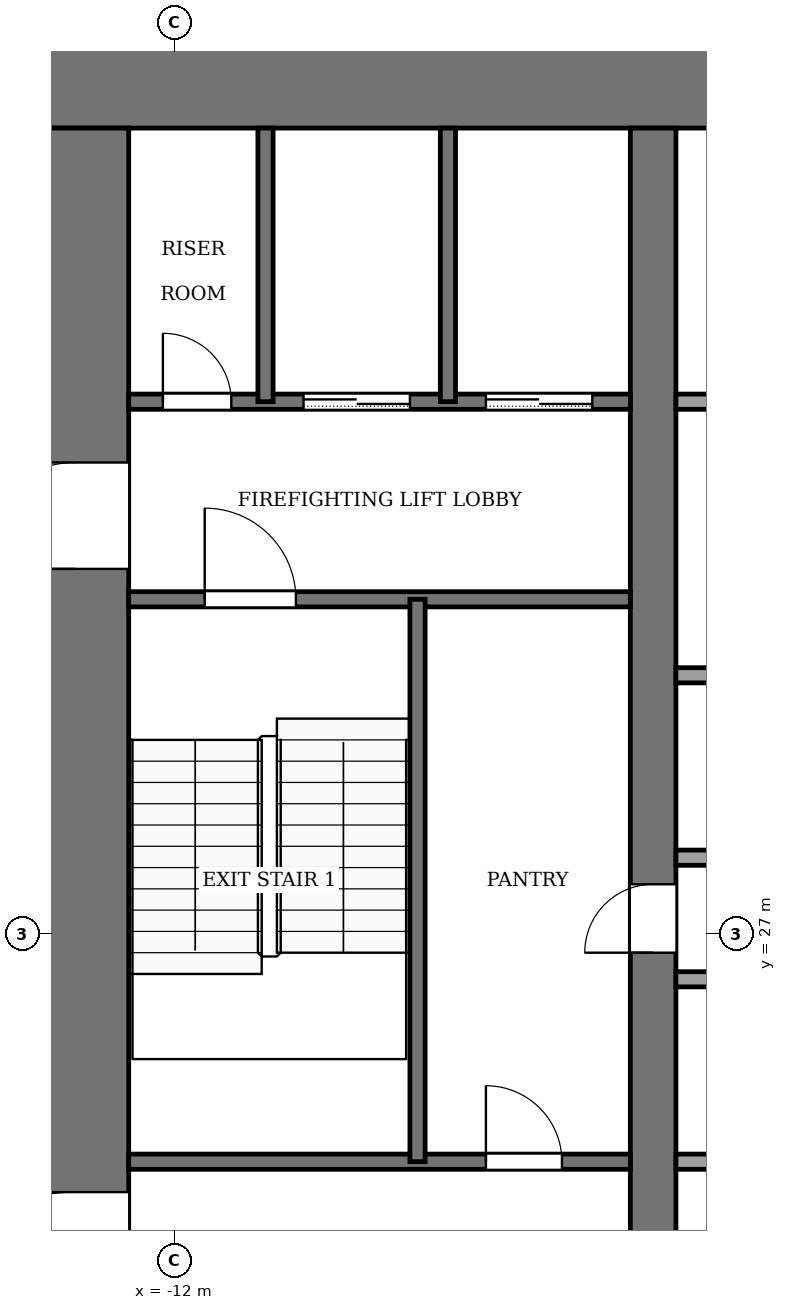
"""IFC4 building model, lengths in metres.
Left out: names, types, materials, properties, quantities, classifications, styles, units other than length and angle.
Written with IfcOpenShell. Run it as: python <this file> out.ifc"""

import sys

from ifc_helpers import new_model, si_unit, direction, frame, frame_2d, origin, place, context, subcontext, project, spatial, rectangle, extrude, element, fill, save


model = new_model("IFC4")
c1 = context("Model", 3, precision=1e-05, world=origin(), true_north=direction((0.0, 1.0)))
c2 = subcontext(c1, "Body", "Model", "MODEL_VIEW")
j1 = project(units=[si_unit("LENGTHUNIT", "METRE"), si_unit("PLANEANGLEUNIT", "RADIAN")], contexts=[c1])
p1 = place(None, origin())
s1 = spatial("IfcSite", under=j1, at=p1, CompositionType="ELEMENT")
p2 = place(p1, origin())
s2 = spatial("IfcBuilding", under=s1, at=p2, CompositionType="ELEMENT")
p3 = place(p2, frame((0.0, 0.0, 46.0)))
s3 = spatial("IfcBuildingStorey", under=s2, at=p3, CompositionType="ELEMENT", Elevation=46.0)
p4 = place(p3, frame((-14.0, 38.3, -0.13), z_axis=(0.0, 0.0, 1.0), x_axis=(1.0, 0.0, 0.0)))
e1 = element("IfcWall", 1, at=p4, inside=s3, PredefinedType="SHEAR", context=c2, shape_type="SweptSolid", body=[
    extrude(rectangle(XDim=28.0, YDim=1.4, at=frame_2d((14.0, 0.0))), origin(), (0.0, 0.0, 1.0), 4.0),
])
p5 = place(p3, frame((-13.3, 18.4, -0.13), z_axis=(0.0, 0.0, 1.0), x_axis=(0.0, 1.0, 0.0)))
e2 = element("IfcWall", 2, at=p5, inside=s3, PredefinedType="SHEAR", context=c2, shape_type="SweptSolid", body=[
    extrude(rectangle(XDim=19.2, YDim=1.4, at=frame_2d((9.6, 0.0))), origin(), (0.0, 0.0, 1.0), 4.0),
])
p6 = place(p5, frame((2.8, 0.0, 0.13)))
e3 = element("IfcOpeningElement", 3, at=p6, cuts=e2, PredefinedType="OPENING", context=c2, shape_type="SweptSolid", body=[
    extrude(rectangle(XDim=2.4, YDim=2.4, at=frame_2d((1.2, 1.2))), frame((0.0, 0.71, 0.0), z_axis=(0.0, -1.0, 0.0), x_axis=(1.0, 0.0, 0.0)), (0.0, 0.0, 1.0), 1.42),
])
p7 = place(p5, frame((13.4, 0.0, 0.13)))
e4 = element("IfcOpeningElement", 4, at=p7, cuts=e2, PredefinedType="OPENING", context=c2, shape_type="SweptSolid", body=[
    extrude(rectangle(XDim=1.4, YDim=2.2, at=frame_2d((0.7, 1.1))), frame((0.0, 0.71, 0.0), z_axis=(0.0, -1.0, 0.0), x_axis=(1.0, 0.0, 0.0)), (0.0, 0.0, 1.0), 1.42),
])
p8 = place(p3, frame((-5.7, 18.4, -0.13), z_axis=(0.0, 0.0, 1.0), x_axis=(0.0, 1.0, 0.0)))
e5 = element("IfcWall", 5, at=p8, inside=s3, PredefinedType="SHEAR", context=c2, shape_type="SweptSolid", body=[
    extrude(rectangle(XDim=19.2, YDim=0.6, at=frame_2d((9.6, 0.0))), origin(), (0.0, 0.0, 1.0), 4.0),
])
p9 = place(p8, frame((8.35, 0.0, 0.13)))
e6 = element("IfcOpeningElement", 6, at=p9, cuts=e5, PredefinedType="OPENING", context=c2, shape_type="SweptSolid", body=[
    extrude(rectangle(XDim=0.9, YDim=2.1, at=frame_2d((0.45, 1.05))), frame((0.0, 0.31, 0.0), z_axis=(0.0, -1.0, 0.0), x_axis=(1.0, 0.0, 0.0)), (0.0, 0.0, 1.0), 0.62),
])
p10 = place(p3, frame((-12.6, 24.0, 0.0), z_axis=(0.0, 0.0, 1.0), x_axis=(1.0, 0.0, 0.0)))
e7 = element("IfcWall", 7, at=p10, inside=s3, PredefinedType="PARTITIONING", context=c2, shape_type="SweptSolid", body=[
    extrude(rectangle(XDim=6.6, YDim=0.2, at=frame_2d((3.3, 0.0))), origin(), (0.0, 0.0, 1.0), 3.87),
])
p11 = place(p10, frame((4.7, 0.0, 0.0)))
e8 = element("IfcOpeningElement", 8, at=p11, cuts=e7, PredefinedType="OPENING", context=c2, shape_type="SweptSolid", body=[
    extrude(rectangle(XDim=1.0, YDim=2.1, at=frame_2d((0.5, 1.05))), frame((0.0, 0.11, 0.0), z_axis=(0.0, -1.0, 0.0), x_axis=(1.0, 0.0, 0.0)), (0.0, 0.0, 1.0), 0.22),
])
p12 = place(p3, frame((-5.4, 24.0, 0.0), z_axis=(0.0, 0.0, 1.0), x_axis=(1.0, 0.0, 0.0)))
e9 = element("IfcWall", 9, at=p12, inside=s3, PredefinedType="PARTITIONING", context=c2, shape_type="SweptSolid", body=[
    extrude(rectangle(XDim=10.8, YDim=0.2, at=frame_2d((5.4, 0.0))), origin(), (0.0, 0.0, 1.0), 3.87),
])
p13 = place(p12, frame((0.75, 0.0, 0.0)))
e10 = element("IfcOpeningElement", 10, at=p13, cuts=e9, PredefinedType="OPENING", context=c2, shape_type="SweptSolid", body=[
    extrude(rectangle(XDim=1.2, YDim=2.2, at=frame_2d((0.6, 1.1))), frame((0.0, 0.11, 0.0), z_axis=(0.0, -1.0, 0.0), x_axis=(1.0, 0.0, 0.0)), (0.0, 0.0, 1.0), 0.22),
])
p14 = place(p12, frame((3.45, 0.0, 0.0)))
e11 = element("IfcOpeningElement", 11, at=p14, cuts=e9, PredefinedType="OPENING", context=c2, shape_type="SweptSolid", body=[
    extrude(rectangle(XDim=1.2, YDim=2.2, at=frame_2d((0.6, 1.1))), frame((0.0, 0.11, 0.0), z_axis=(0.0, -1.0, 0.0), x_axis=(1.0, 0.0, 0.0)), (0.0, 0.0, 1.0), 0.22),
])
p15 = place(p12, frame((6.15, 0.0, 0.0)))
e12 = element("IfcOpeningElement", 12, at=p15, cuts=e9, PredefinedType="OPENING", context=c2, shape_type="SweptSolid", body=[
    extrude(rectangle(XDim=1.2, YDim=2.2, at=frame_2d((0.6, 1.1))), frame((0.0, 0.11, 0.0), z_axis=(0.0, -1.0, 0.0), x_axis=(1.0, 0.0, 0.0)), (0.0, 0.0, 1.0), 0.22),
])
p16 = place(p12, frame((8.85, 0.0, 0.0)))
e13 = element("IfcOpeningElement", 13, at=p16, cuts=e9, PredefinedType="OPENING", context=c2, shape_type="SweptSolid", body=[
    extrude(rectangle(XDim=1.2, YDim=2.2, at=frame_2d((0.6, 1.1))), frame((0.0, 0.11, 0.0), z_axis=(0.0, -1.0, 0.0), x_axis=(1.0, 0.0, 0.0)), (0.0, 0.0, 1.0), 0.22),
])
for number, where, z_axis, x_axis in (
    (14, (-5.4, 26.4, 0.0), (0.0, 0.0, 1.0), (1.0, 0.0, 0.0)),
    (15, (-5.4, 28.0, 0.0), (0.0, 0.0, 1.0), (1.0, 0.0, 0.0)),
    (16, (-5.4, 30.4, 0.0), (0.0, 0.0, 1.0), (1.0, 0.0, 0.0)),
):
    element("IfcWall", number, at=place(p3, frame(where, z_axis=z_axis, x_axis=x_axis)), inside=s3, PredefinedType="PARTITIONING", context=c2, shape_type="SweptSolid", body=[
        extrude(rectangle(XDim=10.8, YDim=0.2, at=frame_2d((5.4, 0.0))), origin(), (0.0, 0.0, 1.0), 3.87),
    ])
p17 = place(p3, frame((-12.6, 31.4, 0.0), z_axis=(0.0, 0.0, 1.0), x_axis=(1.0, 0.0, 0.0)))
e17 = element("IfcWall", 17, at=p17, inside=s3, PredefinedType="PARTITIONING", context=c2, shape_type="SweptSolid", body=[
    extrude(rectangle(XDim=6.6, YDim=0.2, at=frame_2d((3.3, 0.0))), origin(), (0.0, 0.0, 1.0), 3.87),
])
p18 = place(p17, frame((1.0, 0.0, 0.0)))
e18 = element("IfcOpeningElement", 18, at=p18, cuts=e17, PredefinedType="OPENING", context=c2, shape_type="SweptSolid", body=[
    extrude(rectangle(XDim=1.2, YDim=2.2, at=frame_2d((0.6, 1.1))), frame((0.0, 0.11, 0.0), z_axis=(0.0, -1.0, 0.0), x_axis=(1.0, 0.0, 0.0)), (0.0, 0.0, 1.0), 0.22),
])
p19 = place(p3, frame((-12.6, 34.0, 0.0), z_axis=(0.0, 0.0, 1.0), x_axis=(1.0, 0.0, 0.0)))
e19 = element("IfcWall", 19, at=p19, inside=s3, PredefinedType="PARTITIONING", context=c2, shape_type="SweptSolid", body=[
    extrude(rectangle(XDim=6.6, YDim=0.2, at=frame_2d((3.3, 0.0))), origin(), (0.0, 0.0, 1.0), 3.87),
])
p20 = place(p19, frame((4.7, 0.0, 0.0)))
e20 = element("IfcOpeningElement", 20, at=p20, cuts=e19, PredefinedType="OPENING", context=c2, shape_type="SweptSolid", body=[
    extrude(rectangle(XDim=1.4, YDim=2.2, at=frame_2d((0.7, 1.1))), frame((0.0, 0.11, 0.0), z_axis=(0.0, -1.0, 0.0), x_axis=(1.0, 0.0, 0.0)), (0.0, 0.0, 1.0), 0.22),
])
p21 = place(p19, frame((2.3, 0.0, 0.0)))
e21 = element("IfcOpeningElement", 21, at=p21, cuts=e19, PredefinedType="OPENING", context=c2, shape_type="SweptSolid", body=[
    extrude(rectangle(XDim=1.4, YDim=2.2, at=frame_2d((0.7, 1.1))), frame((0.0, 0.11, 0.0), z_axis=(0.0, -1.0, 0.0), x_axis=(1.0, 0.0, 0.0)), (0.0, 0.0, 1.0), 0.22),
])
p22 = place(p19, frame((0.45, 0.0, 0.0)))
e22 = element("IfcOpeningElement", 22, at=p22, cuts=e19, PredefinedType="OPENING", context=c2, shape_type="SweptSolid", body=[
    extrude(rectangle(XDim=0.9, YDim=2.1, at=frame_2d((0.45, 1.05))), frame((0.0, 0.11, 0.0), z_axis=(0.0, -1.0, 0.0), x_axis=(1.0, 0.0, 0.0)), (0.0, 0.0, 1.0), 0.22),
])
p23 = place(p3, frame((-5.4, 34.0, 0.0), z_axis=(0.0, 0.0, 1.0), x_axis=(1.0, 0.0, 0.0)))
e23 = element("IfcWall", 23, at=p23, inside=s3, PredefinedType="PARTITIONING", context=c2, shape_type="SweptSolid", body=[
    extrude(rectangle(XDim=10.8, YDim=0.2, at=frame_2d((5.4, 0.0))), origin(), (0.0, 0.0, 1.0), 3.87),
])
p24 = place(p23, frame((6.15, 0.0, 0.0)))
e24 = element("IfcOpeningElement", 24, at=p24, cuts=e23, PredefinedType="OPENING", context=c2, shape_type="SweptSolid", body=[
    extrude(rectangle(XDim=1.2, YDim=2.2, at=frame_2d((0.6, 1.1))), frame((0.0, 0.11, 0.0), z_axis=(0.0, -1.0, 0.0), x_axis=(1.0, 0.0, 0.0)), (0.0, 0.0, 1.0), 0.22),
])
p25 = place(p23, frame((8.95, 0.0, 0.0)))
e25 = element("IfcOpeningElement", 25, at=p25, cuts=e23, PredefinedType="OPENING", context=c2, shape_type="SweptSolid", body=[
    extrude(rectangle(XDim=1.0, YDim=2.1, at=frame_2d((0.5, 1.05))), frame((0.0, 0.11, 0.0), z_axis=(0.0, -1.0, 0.0), x_axis=(1.0, 0.0, 0.0)), (0.0, 0.0, 1.0), 0.22),
])
p26 = place(p3, frame((-10.8, 34.0, 0.0), z_axis=(0.0, 0.0, 1.0), x_axis=(0.0, 1.0, 0.0)))
e26 = element("IfcWall", 26, at=p26, inside=s3, PredefinedType="PARTITIONING", context=c2, shape_type="SweptSolid", body=[
    extrude(rectangle(XDim=3.6, YDim=0.2, at=frame_2d((1.8, 0.0))), origin(), (0.0, 0.0, 1.0), 3.87),
])
p27 = place(p3, frame((-8.8, 24.0, 0.0), z_axis=(0.0, 0.0, 1.0), x_axis=(0.0, 1.0, 0.0)))
e27 = element("IfcWall", 27, at=p27, inside=s3, PredefinedType="PARTITIONING", context=c2, shape_type="SweptSolid", body=[
    extrude(rectangle(XDim=7.4, YDim=0.2, at=frame_2d((3.7, 0.0))), origin(), (0.0, 0.0, 1.0), 3.87),
])
p28 = place(p3, frame((-8.4, 34.0, 0.0), z_axis=(0.0, 0.0, 1.0), x_axis=(0.0, 1.0, 0.0)))
e28 = element("IfcWall", 28, at=p28, inside=s3, PredefinedType="PARTITIONING", context=c2, shape_type="SweptSolid", body=[
    extrude(rectangle(XDim=3.6, YDim=0.2, at=frame_2d((1.8, 0.0))), origin(), (0.0, 0.0, 1.0), 3.87),
])
p29 = place(p20, origin())
e29 = element("IfcDoor", 29, at=p29, inside=s3, OperationType="SLIDING_TO_LEFT", PredefinedType="DOOR", context=c2, shape_type="SweptSolid", body=[
    extrude(rectangle(XDim=1.4, YDim=2.2, at=frame_2d((0.7, 1.1))), frame((0.0, 0.025, 0.0), z_axis=(0.0, -1.0, 0.0), x_axis=(1.0, 0.0, 0.0)), (0.0, 0.0, 1.0), 0.05),
])
fill(e20, e29)
p30 = place(p21, origin())
e30 = element("IfcDoor", 30, at=p30, inside=s3, OperationType="SLIDING_TO_LEFT", PredefinedType="DOOR", context=c2, shape_type="SweptSolid", body=[
    extrude(rectangle(XDim=1.4, YDim=2.2, at=frame_2d((0.7, 1.1))), frame((0.0, 0.025, 0.0), z_axis=(0.0, -1.0, 0.0), x_axis=(1.0, 0.0, 0.0)), (0.0, 0.0, 1.0), 0.05),
])
fill(e21, e30)
p31 = place(p22, origin())
e31 = element("IfcDoor", 31, at=p31, inside=s3, OperationType="SINGLE_SWING_RIGHT", PredefinedType="DOOR", context=c2, shape_type="SweptSolid", body=[
    extrude(rectangle(XDim=0.9, YDim=2.1, at=frame_2d((0.45, 1.05))), frame((0.0, 0.025, 0.0), z_axis=(0.0, -1.0, 0.0), x_axis=(1.0, 0.0, 0.0)), (0.0, 0.0, 1.0), 0.05),
])
fill(e22, e31)
p32 = place(p11, origin())
e32 = element("IfcDoor", 32, at=p32, inside=s3, OperationType="SINGLE_SWING_LEFT", PredefinedType="DOOR", context=c2, shape_type="SweptSolid", body=[
    extrude(rectangle(XDim=1.0, YDim=2.1, at=frame_2d((0.5, 1.05))), frame((0.0, 0.025, 0.0), z_axis=(0.0, -1.0, 0.0), x_axis=(1.0, 0.0, 0.0)), (0.0, 0.0, 1.0), 0.05),
])
fill(e8, e32)
p33 = place(p9, origin())
e33 = element("IfcDoor", 33, at=p33, inside=s3, OperationType="SINGLE_SWING_RIGHT", PredefinedType="DOOR", context=c2, shape_type="SweptSolid", body=[
    extrude(rectangle(XDim=0.9, YDim=2.1, at=frame_2d((0.45, 1.05))), frame((0.0, 0.025, 0.0), z_axis=(0.0, -1.0, 0.0), x_axis=(1.0, 0.0, 0.0)), (0.0, 0.0, 1.0), 0.05),
])
fill(e6, e33)
p34 = place(p18, origin())
e34 = element("IfcDoor", 34, at=p34, inside=s3, OperationType="SINGLE_SWING_RIGHT", PredefinedType="DOOR", context=c2, shape_type="SweptSolid", body=[
    extrude(rectangle(XDim=1.2, YDim=2.2, at=frame_2d((0.6, 1.1))), frame((0.0, 0.025, 0.0), z_axis=(0.0, -1.0, 0.0), x_axis=(1.0, 0.0, 0.0)), (0.0, 0.0, 1.0), 0.05),
])
fill(e18, e34)
p35 = place(p6, origin())
e35 = element("IfcDoor", 35, at=p35, inside=s3, OperationType="DOUBLE_DOOR_SINGLE_SWING", PredefinedType="DOOR", context=c2, shape_type="SweptSolid", body=[
    extrude(rectangle(XDim=2.4, YDim=2.4, at=frame_2d((1.2, 1.2))), frame((0.0, 0.025, 0.0), z_axis=(0.0, -1.0, 0.0), x_axis=(1.0, 0.0, 0.0)), (0.0, 0.0, 1.0), 0.05),
])
fill(e3, e35)
p36 = place(p7, origin())
e36 = element("IfcDoor", 36, at=p36, inside=s3, OperationType="SINGLE_SWING_RIGHT", PredefinedType="DOOR", context=c2, shape_type="SweptSolid", body=[
    extrude(rectangle(XDim=1.4, YDim=2.2, at=frame_2d((0.7, 1.1))), frame((0.0, 0.025, 0.0), z_axis=(0.0, -1.0, 0.0), x_axis=(1.0, 0.0, 0.0)), (0.0, 0.0, 1.0), 0.05),
])
fill(e4, e36)
save(model, sys.argv[1])
